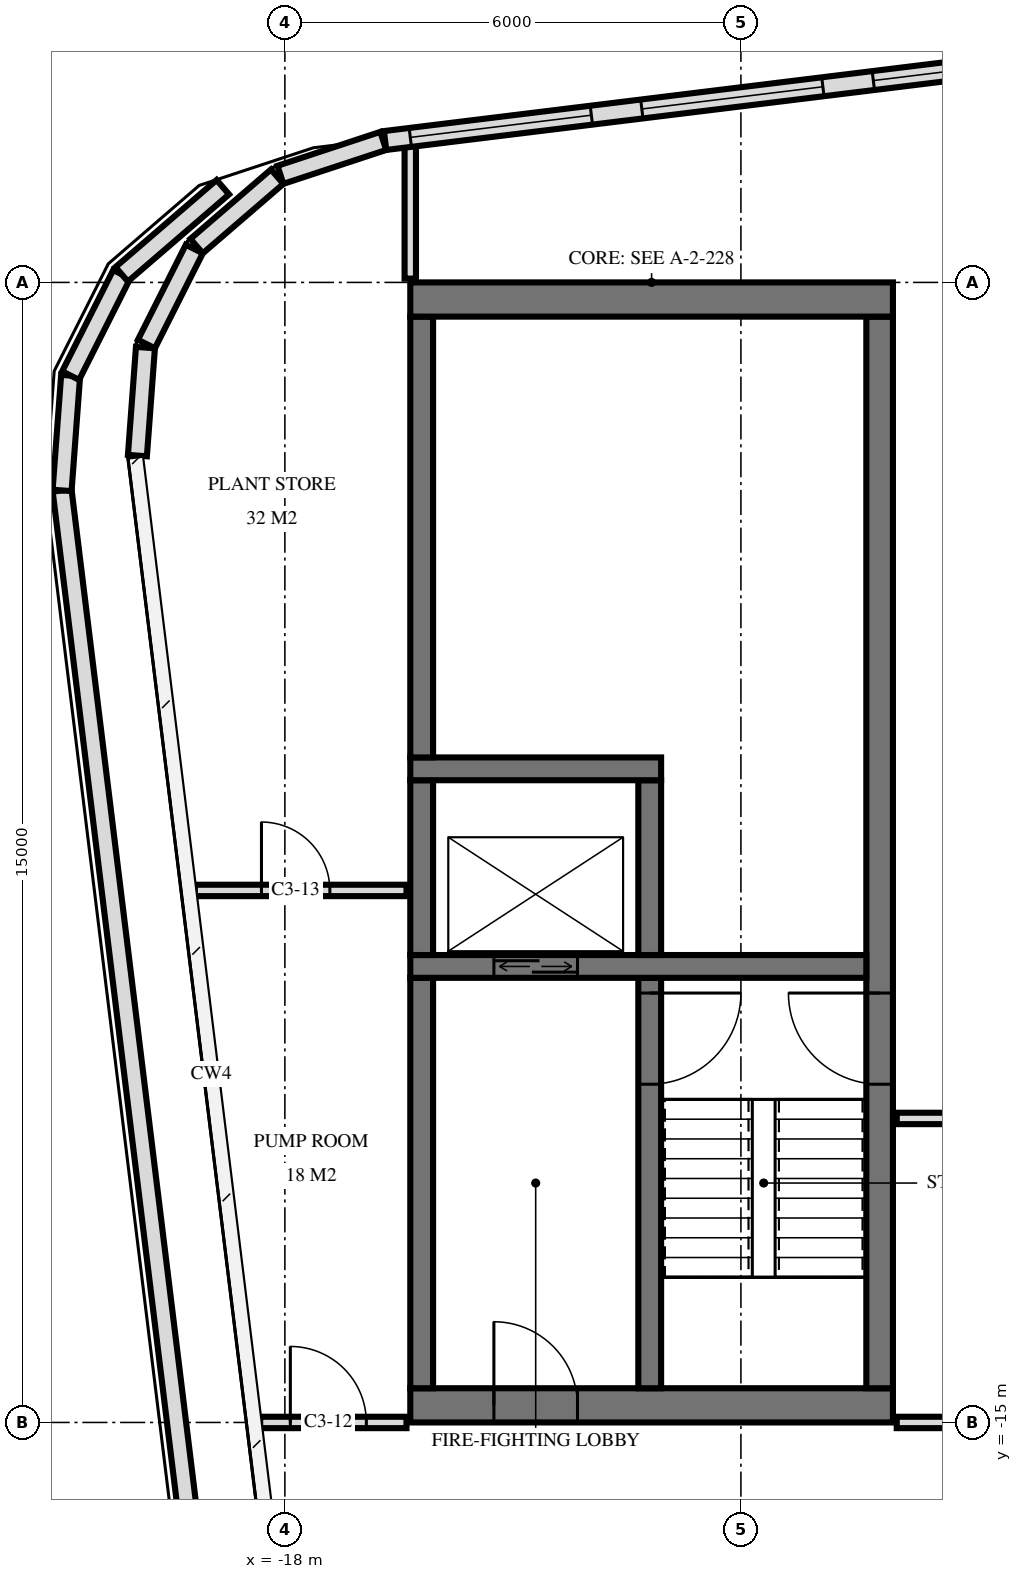
"""IFC4 building model, lengths in metres.
Left out: names, types, materials, properties, quantities, classifications, styles, units other than length and angle.
Written with IfcOpenShell. Run it as: python <this file> out.ifc"""

import sys

from ifc_helpers import new_model, si_unit, direction, frame, frame_2d, origin, place, context, subcontext, project, spatial, rectangle, extrude, element, fill, save


model = new_model("IFC4")
c1 = context("Model", 3, precision=1e-05, world=origin(), true_north=direction((0.0, 1.0)))
c2 = subcontext(c1, "Body", "Model", "MODEL_VIEW")
j1 = project(units=[si_unit("LENGTHUNIT", "METRE"), si_unit("PLANEANGLEUNIT", "RADIAN")], contexts=[c1])
p1 = place(None, origin())
s1 = spatial("IfcSite", under=j1, at=p1, CompositionType="ELEMENT")
p2 = place(p1, origin())
s2 = spatial("IfcBuilding", under=s1, at=p2, CompositionType="ELEMENT")
p3 = place(p2, frame((0.0, 0.0, 353.8)))
s3 = spatial("IfcBuildingStorey", under=s2, at=p3, CompositionType="ELEMENT", Elevation=353.8)
p4 = place(p3, frame((-16.35, -0.225, 0.0), z_axis=(0.0, 0.0, 1.0), x_axis=(1.0, 0.0, 0.0)))
e1 = element("IfcWall", 1, at=p4, inside=s3, PredefinedType="SHEAR", context=c2, shape_type="SweptSolid", body=[
    extrude(rectangle(XDim=6.35, YDim=0.45, at=frame_2d((3.175, 0.0))), origin(), (0.0, 0.0, 1.0), 3.6),
])
p5 = place(p3, frame((-16.35, -14.775, 0.0), z_axis=(0.0, 0.0, 1.0), x_axis=(1.0, 0.0, 0.0)))
e2 = element("IfcWall", 2, at=p5, inside=s3, PredefinedType="SHEAR", context=c2, shape_type="SweptSolid", body=[
    extrude(rectangle(XDim=6.35, YDim=0.45, at=frame_2d((3.175, 0.0))), origin(), (0.0, 0.0, 1.0), 3.6),
])
p6 = place(p5, frame((1.1, 0.0, 0.0)))
e3 = element("IfcOpeningElement", 3, at=p6, cuts=e2, PredefinedType="OPENING", context=c2, shape_type="SweptSolid", body=[
    extrude(rectangle(XDim=1.1, YDim=2.1, at=frame_2d((0.55, 1.05))), frame((0.0, 0.235, 0.0), z_axis=(0.0, -1.0, 0.0), x_axis=(1.0, 0.0, 0.0)), (0.0, 0.0, 1.0), 0.47),
])
p7 = place(p3, frame((-10.175, -14.55, 0.0), z_axis=(0.0, 0.0, 1.0), x_axis=(0.0, 1.0, 0.0)))
e4 = element("IfcWall", 4, at=p7, inside=s3, PredefinedType="SHEAR", context=c2, shape_type="SweptSolid", body=[
    extrude(rectangle(XDim=14.1, YDim=0.35, at=frame_2d((7.05, 0.0))), origin(), (0.0, 0.0, 1.0), 3.6),
])
p8 = place(p7, frame((4.0, 0.0, 0.0)))
e5 = element("IfcOpeningElement", 5, at=p8, cuts=e4, PredefinedType="OPENING", context=c2, shape_type="SweptSolid", body=[
    extrude(rectangle(XDim=1.2, YDim=2.1, at=frame_2d((0.6, 1.05))), frame((0.0, 0.185, 0.0), z_axis=(0.0, -1.0, 0.0), x_axis=(1.0, 0.0, 0.0)), (0.0, 0.0, 1.0), 0.37),
])
p9 = place(p3, frame((-16.2, -6.25, 0.0), z_axis=(0.0, 0.0, 1.0), x_axis=(0.0, 1.0, 0.0)))
e6 = element("IfcWall", 6, at=p9, inside=s3, PredefinedType="SHEAR", context=c2, shape_type="SweptSolid", body=[
    extrude(rectangle(XDim=5.8, YDim=0.3, at=frame_2d((2.9, 0.0))), origin(), (0.0, 0.0, 1.0), 3.6),
])
p10 = place(p3, frame((-16.2, -14.55, 0.0), z_axis=(0.0, 0.0, 1.0), x_axis=(0.0, 1.0, 0.0)))
e7 = element("IfcWall", 7, at=p10, inside=s3, PredefinedType="SHEAR", context=c2, shape_type="SweptSolid", body=[
    extrude(rectangle(XDim=5.4, YDim=0.3, at=frame_2d((2.7, 0.0))), origin(), (0.0, 0.0, 1.0), 3.6),
])
p11 = place(p3, frame((-16.35, -9.0, 0.0), z_axis=(0.0, 0.0, 1.0), x_axis=(1.0, 0.0, 0.0)))
e8 = element("IfcWall", 8, at=p11, inside=s3, PredefinedType="SHEAR", context=c2, shape_type="SweptSolid", body=[
    extrude(rectangle(XDim=6.0, YDim=0.3, at=frame_2d((3.0, 0.0))), origin(), (0.0, 0.0, 1.0), 3.6),
])
p12 = place(p11, frame((1.1, 0.0, 0.0)))
e9 = element("IfcOpeningElement", 9, at=p12, cuts=e8, PredefinedType="OPENING", context=c2, shape_type="SweptSolid", body=[
    extrude(rectangle(XDim=1.1, YDim=2.1, at=frame_2d((0.55, 1.05))), frame((0.0, 0.16, 0.0), z_axis=(0.0, -1.0, 0.0), x_axis=(1.0, 0.0, 0.0)), (0.0, 0.0, 1.0), 0.32),
])
p13 = place(p3, frame((-13.2, -14.55, 0.0), z_axis=(0.0, 0.0, 1.0), x_axis=(0.0, 1.0, 0.0)))
e10 = element("IfcWall", 10, at=p13, inside=s3, PredefinedType="SHEAR", context=c2, shape_type="SweptSolid", body=[
    extrude(rectangle(XDim=5.4, YDim=0.3, at=frame_2d((2.7, 0.0))), origin(), (0.0, 0.0, 1.0), 3.6),
])
p14 = place(p13, frame((4.0, 0.0, 0.0)))
e11 = element("IfcOpeningElement", 11, at=p14, cuts=e10, PredefinedType="OPENING", context=c2, shape_type="SweptSolid", body=[
    extrude(rectangle(XDim=1.2, YDim=2.1, at=frame_2d((0.6, 1.05))), frame((0.0, 0.16, 0.0), z_axis=(0.0, -1.0, 0.0), x_axis=(1.0, 0.0, 0.0)), (0.0, 0.0, 1.0), 0.32),
])
p15 = place(p3, frame((-16.35, -6.4, 0.0), z_axis=(0.0, 0.0, 1.0), x_axis=(1.0, 0.0, 0.0)))
e12 = element("IfcWall", 12, at=p15, inside=s3, PredefinedType="SHEAR", context=c2, shape_type="SweptSolid", body=[
    extrude(rectangle(XDim=3.3, YDim=0.3, at=frame_2d((1.65, 0.0))), origin(), (0.0, 0.0, 1.0), 3.6),
])
for number, where, z_axis, x_axis in (
    (13, (-13.2, -8.85, 0.0), (0.0, 0.0, 1.0), (0.0, 1.0, 0.0)),
    (14, (-16.2, -8.85, 0.0), (0.0, 0.0, 1.0), (0.0, 1.0, 0.0)),
):
    element("IfcWall", number, at=place(p3, frame(where, z_axis=z_axis, x_axis=x_axis)), inside=s3, PredefinedType="SHEAR", context=c2, shape_type="SweptSolid", body=[
        extrude(rectangle(XDim=2.3, YDim=0.3, at=frame_2d((1.15, 0.0))), origin(), (0.0, 0.0, 1.0), 3.6),
    ])
p16 = place(p3, frame((13.778, 5.607, 0.0), z_axis=(0.0, 0.0, 1.0), x_axis=(-0.992546967066, -0.121862702117, 0.0)))
e15 = element("IfcWall", 15, at=p16, inside=s3, PredefinedType="SOLIDWALL", context=c2, shape_type="SweptSolid", body=[
    extrude(rectangle(XDim=30.688, YDim=0.25, at=frame_2d((15.344, 0.0))), origin(), (0.0, 0.0, 1.0), 3.32),
])
p17 = place(p16, frame((0.334, 0.0, 0.498)))
e16 = element("IfcOpeningElement", 16, at=p17, cuts=e15, PredefinedType="OPENING", context=c2, shape_type="SweptSolid", body=[
    extrude(rectangle(XDim=2.4, YDim=2.622, at=frame_2d((1.2, 1.311))), frame((0.0, 0.135, 0.0), z_axis=(0.0, -1.0, 0.0), x_axis=(1.0, 0.0, 0.0)), (0.0, 0.0, 1.0), 0.27),
])
p18 = place(p16, frame((3.403, 0.0, 0.498)))
e17 = element("IfcOpeningElement", 17, at=p18, cuts=e15, PredefinedType="OPENING", context=c2, shape_type="SweptSolid", body=[
    extrude(rectangle(XDim=2.4, YDim=2.622, at=frame_2d((1.2, 1.311))), frame((0.0, 0.135, 0.0), z_axis=(0.0, -1.0, 0.0), x_axis=(1.0, 0.0, 0.0)), (0.0, 0.0, 1.0), 0.27),
])
p19 = place(p16, frame((6.472, 0.0, 0.498)))
e18 = element("IfcOpeningElement", 18, at=p19, cuts=e15, PredefinedType="OPENING", context=c2, shape_type="SweptSolid", body=[
    extrude(rectangle(XDim=2.4, YDim=2.622, at=frame_2d((1.2, 1.311))), frame((0.0, 0.135, 0.0), z_axis=(0.0, -1.0, 0.0), x_axis=(1.0, 0.0, 0.0)), (0.0, 0.0, 1.0), 0.27),
])
p20 = place(p16, frame((9.541, 0.0, 0.498)))
e19 = element("IfcOpeningElement", 19, at=p20, cuts=e15, PredefinedType="OPENING", context=c2, shape_type="SweptSolid", body=[
    extrude(rectangle(XDim=2.4, YDim=2.622, at=frame_2d((1.2, 1.311))), frame((0.0, 0.135, 0.0), z_axis=(0.0, -1.0, 0.0), x_axis=(1.0, 0.0, 0.0)), (0.0, 0.0, 1.0), 0.27),
])
p21 = place(p16, frame((12.61, 0.0, 0.498)))
e20 = element("IfcOpeningElement", 20, at=p21, cuts=e15, PredefinedType="OPENING", context=c2, shape_type="SweptSolid", body=[
    extrude(rectangle(XDim=2.4, YDim=2.622, at=frame_2d((1.2, 1.311))), frame((0.0, 0.135, 0.0), z_axis=(0.0, -1.0, 0.0), x_axis=(1.0, 0.0, 0.0)), (0.0, 0.0, 1.0), 0.27),
])
p22 = place(p16, frame((15.678, 0.0, 0.498)))
e21 = element("IfcOpeningElement", 21, at=p22, cuts=e15, PredefinedType="OPENING", context=c2, shape_type="SweptSolid", body=[
    extrude(rectangle(XDim=2.4, YDim=2.622, at=frame_2d((1.2, 1.311))), frame((0.0, 0.135, 0.0), z_axis=(0.0, -1.0, 0.0), x_axis=(1.0, 0.0, 0.0)), (0.0, 0.0, 1.0), 0.27),
])
p23 = place(p16, frame((18.747, 0.0, 0.498)))
e22 = element("IfcOpeningElement", 22, at=p23, cuts=e15, PredefinedType="OPENING", context=c2, shape_type="SweptSolid", body=[
    extrude(rectangle(XDim=2.4, YDim=2.622, at=frame_2d((1.2, 1.311))), frame((0.0, 0.135, 0.0), z_axis=(0.0, -1.0, 0.0), x_axis=(1.0, 0.0, 0.0)), (0.0, 0.0, 1.0), 0.27),
])
p24 = place(p16, frame((21.816, 0.0, 0.498)))
e23 = element("IfcOpeningElement", 23, at=p24, cuts=e15, PredefinedType="OPENING", context=c2, shape_type="SweptSolid", body=[
    extrude(rectangle(XDim=2.4, YDim=2.622, at=frame_2d((1.2, 1.311))), frame((0.0, 0.135, 0.0), z_axis=(0.0, -1.0, 0.0), x_axis=(1.0, 0.0, 0.0)), (0.0, 0.0, 1.0), 0.27),
])
p25 = place(p16, frame((24.885, 0.0, 0.498)))
e24 = element("IfcOpeningElement", 24, at=p25, cuts=e15, PredefinedType="OPENING", context=c2, shape_type="SweptSolid", body=[
    extrude(rectangle(XDim=2.4, YDim=2.622, at=frame_2d((1.2, 1.311))), frame((0.0, 0.135, 0.0), z_axis=(0.0, -1.0, 0.0), x_axis=(1.0, 0.0, 0.0)), (0.0, 0.0, 1.0), 0.27),
])
p26 = place(p16, frame((27.954, 0.0, 0.498)))
e25 = element("IfcOpeningElement", 25, at=p26, cuts=e15, PredefinedType="OPENING", context=c2, shape_type="SweptSolid", body=[
    extrude(rectangle(XDim=2.4, YDim=2.622, at=frame_2d((1.2, 1.311))), frame((0.0, 0.135, 0.0), z_axis=(0.0, -1.0, 0.0), x_axis=(1.0, 0.0, 0.0)), (0.0, 0.0, 1.0), 0.27),
])
p27 = place(p3, frame((-16.706, 1.862, 0.0), z_axis=(0.0, 0.0, 1.0), x_axis=(-0.949672495635, -0.313244554677, 0.0)))
e26 = element("IfcWall", 26, at=p27, inside=s3, PredefinedType="SOLIDWALL", context=c2, shape_type="SweptSolid", body=[
    extrude(rectangle(XDim=1.425, YDim=0.25, at=frame_2d((0.712, 0.0))), origin(), (0.0, 0.0, 1.0), 3.32),
])
for number, where, z_axis, x_axis in (
    (27, (-18.101, 1.392, 0.0), (0.0, 0.0, 1.0), (-0.757, -0.653, 0.0)),
    (28, (-19.191, 0.439, 0.0), (0.0, 0.0, 1.0), (-0.45, -0.893, 0.0)),
):
    element("IfcWall", number, at=place(p3, frame(where, z_axis=z_axis, x_axis=x_axis)), inside=s3, PredefinedType="SOLIDWALL", context=c2, shape_type="SweptSolid", body=[
        extrude(rectangle(XDim=1.4, YDim=0.25, at=frame_2d((0.7, 0.0))), origin(), (0.0, 0.0, 1.0), 3.32),
    ])
p28 = place(p3, frame((-19.834, -0.857, 0.0), z_axis=(0.0, 0.0, 1.0), x_axis=(-0.074023164536, -0.997256522221, 0.0)))
e29 = element("IfcWall", 29, at=p28, inside=s3, PredefinedType="SOLIDWALL", context=c2, shape_type="SweptSolid", body=[
    extrude(rectangle(XDim=1.425, YDim=0.25, at=frame_2d((0.712, 0.0))), origin(), (0.0, 0.0, 1.0), 3.32),
])
p29 = place(p3, frame((-18.83, -19.845, 0.0), z_axis=(0.0, 0.0, 1.0), x_axis=(-0.121865842614, 0.992546581478, 0.0)))
e30 = element("IfcWall", 30, at=p29, inside=s3, PredefinedType="PARAPET", context=c2, shape_type="SweptSolid", body=[
    extrude(rectangle(XDim=17.237, YDim=0.25, at=frame_2d((8.618, 0.0))), origin(), (0.0, 0.0, 1.0), 1.1),
])
p30 = place(p3, frame((-20.931, -2.737, 0.0), z_axis=(0.0, 0.0, 1.0), x_axis=(0.074144794539, 0.997247486556, 0.0)))
e31 = element("IfcWall", 31, at=p30, inside=s3, PredefinedType="PARAPET", context=c2, shape_type="SweptSolid", body=[
    extrude(rectangle(XDim=1.515, YDim=0.25, at=frame_2d((0.757, 0.0))), origin(), (0.0, 0.0, 1.0), 1.1),
])
p31 = place(p3, frame((-20.819, -1.226, 0.0), z_axis=(0.0, 0.0, 1.0), x_axis=(0.450089760611, 0.892983318653, 0.0)))
e32 = element("IfcWall", 32, at=p31, inside=s3, PredefinedType="PARAPET", context=c2, shape_type="SweptSolid", body=[
    extrude(rectangle(XDim=1.493, YDim=0.25, at=frame_2d((0.746, 0.0))), origin(), (0.0, 0.0, 1.0), 1.1),
])
p32 = place(p3, frame((-20.147, 0.107, 0.0), z_axis=(0.0, 0.0, 1.0), x_axis=(0.757566389355, 0.65275812191, 0.0)))
e33 = element("IfcWall", 33, at=p32, inside=s3, PredefinedType="PARAPET", context=c2, shape_type="SweptSolid", body=[
    extrude(rectangle(XDim=1.756, YDim=0.25, at=frame_2d((0.878, 0.0))), origin(), (0.0, 0.0, 1.0), 1.1),
])
p33 = place(p3, frame((-16.35, 0.05, 0.0), z_axis=(0.0, 0.0, 1.0), x_axis=(0.0, 1.0, 0.0)))
e34 = element("IfcWall", 34, at=p33, inside=s3, PredefinedType="PARTITIONING", context=c2, shape_type="SweptSolid", body=[
    extrude(rectangle(XDim=1.742, YDim=0.15, at=frame_2d((0.871, 0.0))), origin(), (0.0, 0.0, 1.0), 3.32),
])
p34 = place(p3, frame((-18.325, -15.0, 0.0), z_axis=(0.0, 0.0, 1.0), x_axis=(1.0, 0.0, 0.0)))
e35 = element("IfcWall", 35, at=p34, inside=s3, PredefinedType="PARTITIONING", context=c2, shape_type="SweptSolid", body=[
    extrude(rectangle(XDim=1.925, YDim=0.15, at=frame_2d((0.962, 0.0))), origin(), (0.0, 0.0, 1.0), 3.32),
])
p35 = place(p34, frame((0.397, 0.0, 0.0)))
e36 = element("IfcOpeningElement", 36, at=p35, cuts=e35, PredefinedType="OPENING", context=c2, shape_type="SweptSolid", body=[
    extrude(rectangle(XDim=1.0, YDim=2.1, at=frame_2d((0.5, 1.05))), frame((0.0, 0.085, 0.0), z_axis=(0.0, -1.0, 0.0), x_axis=(1.0, 0.0, 0.0)), (0.0, 0.0, 1.0), 0.17),
])
p36 = place(p3, frame((-9.95, -15.0, 0.0), z_axis=(0.0, 0.0, 1.0), x_axis=(1.0, 0.0, 0.0)))
e37 = element("IfcWall", 37, at=p36, inside=s3, PredefinedType="PARTITIONING", context=c2, shape_type="SweptSolid", body=[
    extrude(rectangle(XDim=19.9, YDim=0.15, at=frame_2d((9.95, 0.0))), origin(), (0.0, 0.0, 1.0), 2.684),
])
p37 = place(p36, frame((9.43, 0.0, 0.0)))
e38 = element("IfcOpeningElement", 38, at=p37, cuts=e37, PredefinedType="OPENING", context=c2, shape_type="SweptSolid", body=[
    extrude(rectangle(XDim=1.0, YDim=2.1, at=frame_2d((0.5, 1.05))), frame((0.0, 0.085, 0.0), z_axis=(0.0, -1.0, 0.0), x_axis=(1.0, 0.0, 0.0)), (0.0, 0.0, 1.0), 0.17),
])
p38 = place(p3, frame((-9.95, -11.0, 0.0), z_axis=(0.0, 0.0, 1.0), x_axis=(1.0, 0.0, 0.0)))
e39 = element("IfcWall", 39, at=p38, inside=s3, PredefinedType="PARTITIONING", context=c2, shape_type="SweptSolid", body=[
    extrude(rectangle(XDim=19.9, YDim=0.15, at=frame_2d((9.95, 0.0))), origin(), (0.0, 0.0, 1.0), 3.32),
])
p39 = place(p3, frame((-19.185, -8.0, 0.0), z_axis=(0.0, 0.0, 1.0), x_axis=(1.0, 0.0, 0.0)))
e40 = element("IfcWall", 40, at=p39, inside=s3, PredefinedType="PARTITIONING", context=c2, shape_type="SweptSolid", body=[
    extrude(rectangle(XDim=2.785, YDim=0.15, at=frame_2d((1.392, 0.0))), origin(), (0.0, 0.0, 1.0), 3.32),
])
p40 = place(p39, frame((0.876, 0.0, 0.0)))
e41 = element("IfcOpeningElement", 41, at=p40, cuts=e40, PredefinedType="OPENING", context=c2, shape_type="SweptSolid", body=[
    extrude(rectangle(XDim=0.9, YDim=2.1, at=frame_2d((0.45, 1.05))), frame((0.0, 0.085, 0.0), z_axis=(0.0, -1.0, 0.0), x_axis=(1.0, 0.0, 0.0)), (0.0, 0.0, 1.0), 0.17),
])
p41 = place(p24, origin())
e42 = element("IfcWindow", 42, at=p41, inside=s3, PartitioningType="SINGLE_PANEL", PredefinedType="USERDEFINED", context=c2, shape_type="SweptSolid", body=[
    extrude(rectangle(XDim=2.4, YDim=2.622, at=frame_2d((1.2, 1.311))), frame((0.0, 0.03, 0.0), z_axis=(0.0, -1.0, 0.0), x_axis=(1.0, 0.0, 0.0)), (0.0, 0.0, 1.0), 0.06),
])
fill(e23, e42)
p42 = place(p25, origin())
e43 = element("IfcWindow", 43, at=p42, inside=s3, PartitioningType="SINGLE_PANEL", PredefinedType="USERDEFINED", context=c2, shape_type="SweptSolid", body=[
    extrude(rectangle(XDim=2.4, YDim=2.622, at=frame_2d((1.2, 1.311))), frame((0.0, 0.03, 0.0), z_axis=(0.0, -1.0, 0.0), x_axis=(1.0, 0.0, 0.0)), (0.0, 0.0, 1.0), 0.06),
])
fill(e24, e43)
p43 = place(p26, origin())
e44 = element("IfcWindow", 44, at=p43, inside=s3, PartitioningType="SINGLE_PANEL", PredefinedType="USERDEFINED", context=c2, shape_type="SweptSolid", body=[
    extrude(rectangle(XDim=2.4, YDim=2.622, at=frame_2d((1.2, 1.311))), frame((0.0, 0.03, 0.0), z_axis=(0.0, -1.0, 0.0), x_axis=(1.0, 0.0, 0.0)), (0.0, 0.0, 1.0), 0.06),
])
fill(e25, e44)
p44 = place(p12, origin())
e45 = element("IfcDoor", 45, at=p44, inside=s3, OperationType="DOUBLE_DOOR_SLIDING", PredefinedType="USERDEFINED", context=c2, shape_type="SweptSolid", body=[
    extrude(rectangle(XDim=1.1, YDim=2.1, at=frame_2d((0.55, 1.05))), frame((0.0, 0.025, 0.0), z_axis=(0.0, -1.0, 0.0), x_axis=(1.0, 0.0, 0.0)), (0.0, 0.0, 1.0), 0.05),
])
fill(e9, e45)
p45 = place(p8, origin())
e46 = element("IfcDoor", 46, at=p45, inside=s3, OperationType="SINGLE_SWING_LEFT", PredefinedType="DOOR", context=c2, shape_type="SweptSolid", body=[
    extrude(rectangle(XDim=1.2, YDim=2.1, at=frame_2d((0.6, 1.05))), frame((0.0, 0.025, 0.0), z_axis=(0.0, -1.0, 0.0), x_axis=(1.0, 0.0, 0.0)), (0.0, 0.0, 1.0), 0.05),
])
fill(e5, e46)
p46 = place(p6, origin())
e47 = element("IfcDoor", 47, at=p46, inside=s3, OperationType="SINGLE_SWING_RIGHT", PredefinedType="DOOR", context=c2, shape_type="SweptSolid", body=[
    extrude(rectangle(XDim=1.1, YDim=2.1, at=frame_2d((0.55, 1.05))), frame((0.0, 0.025, 0.0), z_axis=(0.0, -1.0, 0.0), x_axis=(1.0, 0.0, 0.0)), (0.0, 0.0, 1.0), 0.05),
])
fill(e3, e47)
p47 = place(p14, frame((0.6, 0.0, 0.0), z_axis=(0.0, 0.0, 1.0), x_axis=(-1.0, 0.0, 0.0)))
e48 = element("IfcDoor", 48, at=p47, inside=s3, OperationType="SINGLE_SWING_RIGHT", PredefinedType="DOOR", context=c2, shape_type="SweptSolid", body=[
    extrude(rectangle(XDim=1.2, YDim=2.1, at=frame_2d((0.0, 1.05))), frame((0.0, -0.025, 0.0), z_axis=(0.0, 1.0, 0.0), x_axis=(-1.0, 0.0, 0.0)), (0.0, 0.0, 1.0), 0.05),
])
fill(e11, e48)
p48 = place(p35, origin())
e49 = element("IfcDoor", 49, at=p48, inside=s3, OperationType="SINGLE_SWING_RIGHT", PredefinedType="DOOR", context=c2, shape_type="SweptSolid", body=[
    extrude(rectangle(XDim=1.0, YDim=2.1, at=frame_2d((0.5, 1.05))), frame((0.0, 0.025, 0.0), z_axis=(0.0, -1.0, 0.0), x_axis=(1.0, 0.0, 0.0)), (0.0, 0.0, 1.0), 0.05),
])
fill(e36, e49)
p49 = place(p40, origin())
e50 = element("IfcDoor", 50, at=p49, inside=s3, OperationType="SINGLE_SWING_RIGHT", PredefinedType="DOOR", context=c2, shape_type="SweptSolid", body=[
    extrude(rectangle(XDim=0.9, YDim=2.1, at=frame_2d((0.45, 1.05))), frame((0.0, 0.025, 0.0), z_axis=(0.0, -1.0, 0.0), x_axis=(1.0, 0.0, 0.0)), (0.0, 0.0, 1.0), 0.05),
])
fill(e41, e50)
save(model, sys.argv[1])
